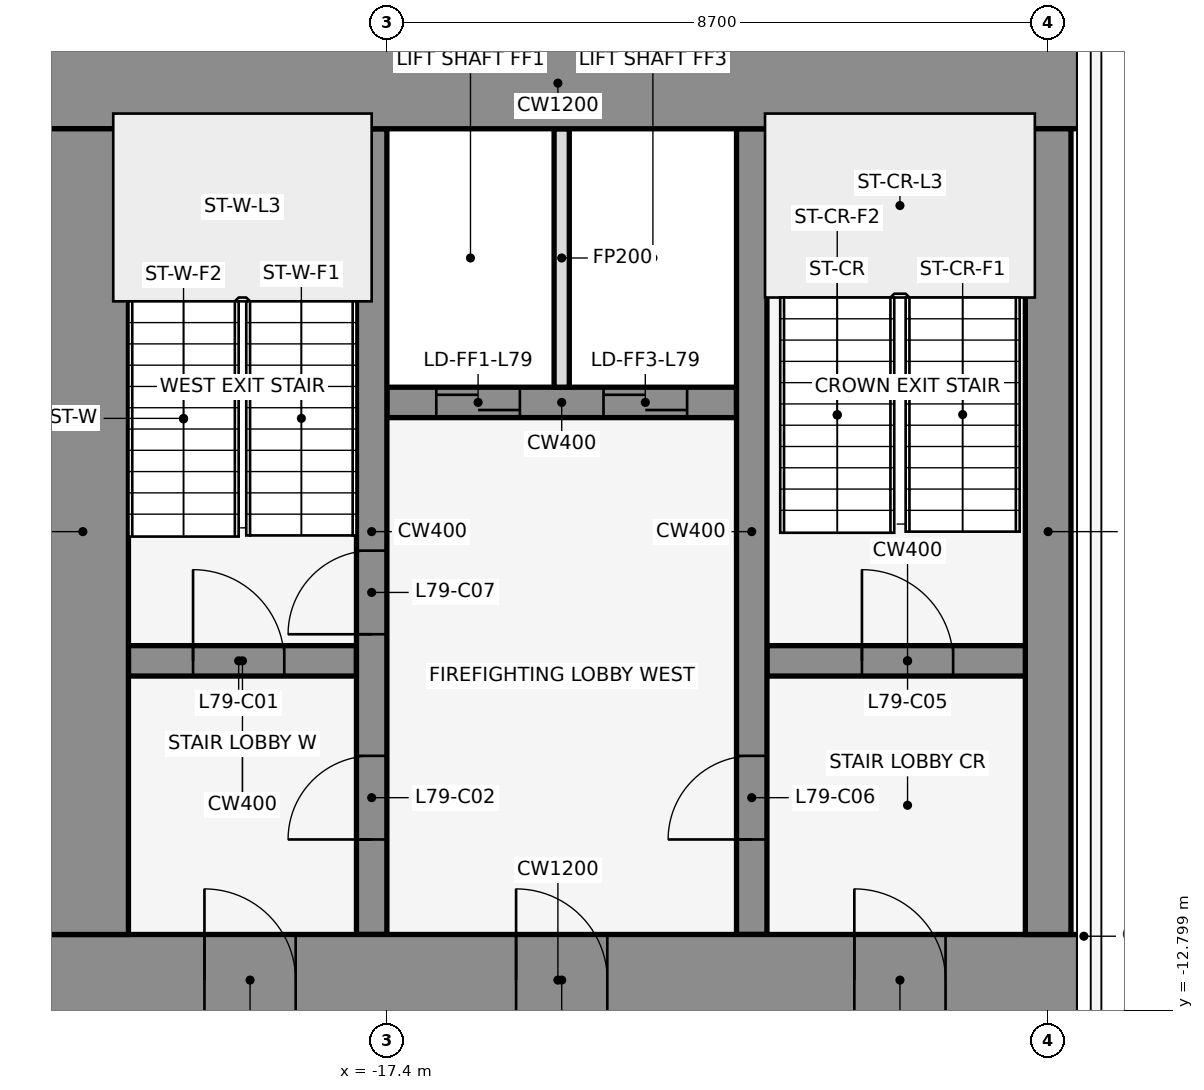
"""IFC4 building model, lengths in metres.
Left out: names, types, materials, properties, quantities, classifications, styles, units other than length and angle.
Written with IfcOpenShell. Run it as: python <this file> out.ifc"""

import sys

from ifc_helpers import new_model, si_unit, direction, frame, frame_2d, origin, place, context, subcontext, project, spatial, rectangle, extrude, element, fill, save


model = new_model("IFC4")
c1 = context("Model", 3, precision=1e-05, world=origin(), true_north=direction((0.0, 1.0)))
c2 = subcontext(c1, "Body", "Model", "MODEL_VIEW")
j1 = project(units=[si_unit("LENGTHUNIT", "METRE"), si_unit("PLANEANGLEUNIT", "RADIAN")], contexts=[c1])
p1 = place(None, origin())
s1 = spatial("IfcSite", under=j1, at=p1, CompositionType="ELEMENT")
p2 = place(p1, origin())
s2 = spatial("IfcBuilding", under=s1, at=p2, CompositionType="ELEMENT")
p3 = place(p2, frame((0.0, 0.0, 352.4)))
s3 = spatial("IfcBuildingStorey", under=s2, at=p3, CompositionType="ELEMENT", Elevation=352.4)
p4 = place(p3, frame((-20.8, -8.2, 0.0), z_axis=(0.0, 0.0, 1.0), x_axis=(1.0, 0.0, 0.0)))
e1 = element("IfcWall", 1, at=p4, inside=s3, PredefinedType="SHEAR", context=c2, shape_type="SweptSolid", body=[
    extrude(rectangle(XDim=3.0, YDim=0.4, at=frame_2d((1.5, 0.0))), origin(), (0.0, 0.0, 1.0), 4.5),
])
p5 = place(p4, frame((0.85, 0.0, 0.0)))
e2 = element("IfcOpeningElement", 2, at=p5, cuts=e1, PredefinedType="OPENING", context=c2, shape_type="SweptSolid", body=[
    extrude(rectangle(XDim=1.2, YDim=2.1, at=frame_2d((0.6, 1.05))), frame((0.0, 0.212, 0.0), z_axis=(0.0, -1.0, 0.0), x_axis=(1.0, 0.0, 0.0)), (0.0, 0.0, 1.0), 0.424),
])
p6 = place(p3, frame((-12.4, -8.2, 0.0), z_axis=(0.0, 0.0, 1.0), x_axis=(1.0, 0.0, 0.0)))
e3 = element("IfcWall", 3, at=p6, inside=s3, PredefinedType="SHEAR", context=c2, shape_type="SweptSolid", body=[
    extrude(rectangle(XDim=3.7, YDim=0.4, at=frame_2d((1.85, 0.0))), origin(), (0.0, 0.0, 1.0), 4.5),
])
p7 = place(p6, frame((1.25, 0.0, 0.0)))
e4 = element("IfcOpeningElement", 4, at=p7, cuts=e3, PredefinedType="OPENING", context=c2, shape_type="SweptSolid", body=[
    extrude(rectangle(XDim=1.2, YDim=2.1, at=frame_2d((0.6, 1.05))), frame((0.0, 0.212, 0.0), z_axis=(0.0, -1.0, 0.0), x_axis=(1.0, 0.0, 0.0)), (0.0, 0.0, 1.0), 0.424),
])
p8 = place(p3, frame((-17.4, -4.8, 0.0), z_axis=(0.0, 0.0, 1.0), x_axis=(1.0, 0.0, 0.0)))
e5 = element("IfcWall", 5, at=p8, inside=s3, PredefinedType="SHEAR", context=c2, shape_type="SweptSolid", body=[
    extrude(rectangle(XDim=4.6, YDim=0.4, at=frame_2d((2.3, 0.0))), origin(), (0.0, 0.0, 1.0), 4.5),
])
p9 = place(p8, frame((0.65, 0.0, 0.0)))
e6 = element("IfcOpeningElement", 6, at=p9, cuts=e5, PredefinedType="OPENING", context=c2, shape_type="SweptSolid", body=[
    extrude(rectangle(XDim=1.1, YDim=2.1, at=frame_2d((0.55, 1.05))), frame((0.0, 0.212, 0.0), z_axis=(0.0, -1.0, 0.0), x_axis=(1.0, 0.0, 0.0)), (0.0, 0.0, 1.0), 0.424),
])
p10 = place(p8, frame((2.85, 0.0, 0.0)))
e7 = element("IfcOpeningElement", 7, at=p10, cuts=e5, PredefinedType="OPENING", context=c2, shape_type="SweptSolid", body=[
    extrude(rectangle(XDim=1.1, YDim=2.1, at=frame_2d((0.55, 1.05))), frame((0.0, 0.212, 0.0), z_axis=(0.0, -1.0, 0.0), x_axis=(1.0, 0.0, 0.0)), (0.0, 0.0, 1.0), 0.424),
])
p11 = place(p3, frame((-17.6, -11.8, 0.0), z_axis=(0.0, 0.0, 1.0), x_axis=(0.0, 1.0, 0.0)))
e8 = element("IfcWall", 8, at=p11, inside=s3, PredefinedType="SHEAR", context=c2, shape_type="SweptSolid", body=[
    extrude(rectangle(XDim=10.6, YDim=0.4, at=frame_2d((5.3, 0.0))), origin(), (0.0, 0.0, 1.0), 4.5),
])
p12 = place(p11, frame((1.25, 0.0, 0.0)))
e9 = element("IfcOpeningElement", 9, at=p12, cuts=e8, PredefinedType="OPENING", context=c2, shape_type="SweptSolid", body=[
    extrude(rectangle(XDim=1.1, YDim=2.1, at=frame_2d((0.55, 1.05))), frame((0.0, 0.212, 0.0), z_axis=(0.0, -1.0, 0.0), x_axis=(1.0, 0.0, 0.0)), (0.0, 0.0, 1.0), 0.424),
])
p13 = place(p11, frame((3.95, 0.0, 0.0)))
e10 = element("IfcOpeningElement", 10, at=p13, cuts=e8, PredefinedType="OPENING", context=c2, shape_type="SweptSolid", body=[
    extrude(rectangle(XDim=1.1, YDim=2.1, at=frame_2d((0.55, 1.05))), frame((0.0, 0.212, 0.0), z_axis=(0.0, -1.0, 0.0), x_axis=(1.0, 0.0, 0.0)), (0.0, 0.0, 1.0), 0.424),
])
p14 = place(p3, frame((-15.1, -4.6, 0.0), z_axis=(0.0, 0.0, 1.0), x_axis=(0.0, 1.0, 0.0)))
e11 = element("IfcWall", 11, at=p14, inside=s3, PredefinedType="PARTITIONING", context=c2, shape_type="SweptSolid", body=[
    extrude(rectangle(XDim=3.4, YDim=0.2, at=frame_2d((1.7, 0.0))), origin(), (0.0, 0.0, 1.0), 3.368),
])
p15 = place(p3, frame((-12.6, -11.8, 0.0), z_axis=(0.0, 0.0, 1.0), x_axis=(0.0, 1.0, 0.0)))
e12 = element("IfcWall", 12, at=p15, inside=s3, PredefinedType="SHEAR", context=c2, shape_type="SweptSolid", body=[
    extrude(rectangle(XDim=10.6, YDim=0.4, at=frame_2d((5.3, 0.0))), origin(), (0.0, 0.0, 1.0), 4.5),
])
p16 = place(p15, frame((1.25, 0.0, 0.0)))
e13 = element("IfcOpeningElement", 13, at=p16, cuts=e12, PredefinedType="OPENING", context=c2, shape_type="SweptSolid", body=[
    extrude(rectangle(XDim=1.1, YDim=2.1, at=frame_2d((0.55, 1.05))), frame((0.0, 0.212, 0.0), z_axis=(0.0, -1.0, 0.0), x_axis=(1.0, 0.0, 0.0)), (0.0, 0.0, 1.0), 0.424),
])
p17 = place(p3, frame((-22.0, -0.6, 0.0), z_axis=(0.0, 0.0, 1.0), x_axis=(1.0, 0.0, 0.0)))
e14 = element("IfcWall", 14, at=p17, inside=s3, PredefinedType="SHEAR", context=c2, shape_type="SweptSolid", body=[
    extrude(rectangle(XDim=13.7, YDim=1.2, at=frame_2d((6.85, 0.0))), origin(), (0.0, 0.0, 1.0), 4.5),
])
p18 = place(p3, frame((-22.0, -12.4, 0.0), z_axis=(0.0, 0.0, 1.0), x_axis=(1.0, 0.0, 0.0)))
e15 = element("IfcWall", 15, at=p18, inside=s3, PredefinedType="SHEAR", context=c2, shape_type="SweptSolid", body=[
    extrude(rectangle(XDim=13.7, YDim=1.2, at=frame_2d((6.85, 0.0))), origin(), (0.0, 0.0, 1.0), 4.5),
])
p19 = place(p18, frame((2.2, 0.0, 0.0)))
e16 = element("IfcOpeningElement", 16, at=p19, cuts=e15, PredefinedType="OPENING", context=c2, shape_type="SweptSolid", body=[
    extrude(rectangle(XDim=1.2, YDim=2.1, at=frame_2d((0.6, 1.05))), frame((0.0, 0.612, 0.0), z_axis=(0.0, -1.0, 0.0), x_axis=(1.0, 0.0, 0.0)), (0.0, 0.0, 1.0), 1.224),
])
p20 = place(p18, frame((10.75, 0.0, 0.0)))
e17 = element("IfcOpeningElement", 17, at=p20, cuts=e15, PredefinedType="OPENING", context=c2, shape_type="SweptSolid", body=[
    extrude(rectangle(XDim=1.2, YDim=2.1, at=frame_2d((0.6, 1.05))), frame((0.0, 0.612, 0.0), z_axis=(0.0, -1.0, 0.0), x_axis=(1.0, 0.0, 0.0)), (0.0, 0.0, 1.0), 1.224),
])
p21 = place(p18, frame((6.3, 0.0, 0.0)))
e18 = element("IfcOpeningElement", 18, at=p21, cuts=e15, PredefinedType="OPENING", context=c2, shape_type="SweptSolid", body=[
    extrude(rectangle(XDim=1.2, YDim=2.1, at=frame_2d((0.6, 1.05))), frame((0.0, 0.612, 0.0), z_axis=(0.0, -1.0, 0.0), x_axis=(1.0, 0.0, 0.0)), (0.0, 0.0, 1.0), 1.224),
])
p22 = place(p3, frame((-21.4, -11.8, 0.0), z_axis=(0.0, 0.0, 1.0), x_axis=(0.0, 1.0, 0.0)))
e19 = element("IfcWall", 19, at=p22, inside=s3, PredefinedType="SHEAR", context=c2, shape_type="SweptSolid", body=[
    extrude(rectangle(XDim=10.6, YDim=1.2, at=frame_2d((5.3, 0.0))), origin(), (0.0, 0.0, 1.0), 4.5),
])
p23 = place(p3, frame((-8.7, -11.8, 0.0), z_axis=(0.0, 0.0, 1.0), x_axis=(0.0, 1.0, 0.0)))
e20 = element("IfcWall", 20, at=p23, inside=s3, PredefinedType="SHEAR", context=c2, shape_type="SweptSolid", body=[
    extrude(rectangle(XDim=10.6, YDim=0.6, at=frame_2d((5.3, 0.0))), origin(), (0.0, 0.0, 1.0), 4.5),
])
p24 = place(p5, origin())
e21 = element("IfcDoor", 21, at=p24, inside=s3, OperationType="SINGLE_SWING_LEFT", PredefinedType="DOOR", context=c2, shape_type="SweptSolid", body=[
    extrude(rectangle(XDim=1.2, YDim=2.1, at=frame_2d((0.6, 1.05))), frame((0.0, 0.025, 0.0), z_axis=(0.0, -1.0, 0.0), x_axis=(1.0, 0.0, 0.0)), (0.0, 0.0, 1.0), 0.05),
])
fill(e2, e21)
p25 = place(p12, frame((1.1, 0.0, 0.0), z_axis=(0.0, 0.0, 1.0), x_axis=(-1.0, 0.0, 0.0)))
e22 = element("IfcDoor", 22, at=p25, inside=s3, OperationType="SINGLE_SWING_LEFT", PredefinedType="DOOR", context=c2, shape_type="SweptSolid", body=[
    extrude(rectangle(XDim=1.1, YDim=2.1, at=frame_2d((0.55, 1.05))), frame((0.0, 0.025, 0.0), z_axis=(0.0, -1.0, 0.0), x_axis=(1.0, 0.0, 0.0)), (0.0, 0.0, 1.0), 0.05),
])
fill(e9, e22)
p26 = place(p7, origin())
e23 = element("IfcDoor", 23, at=p26, inside=s3, OperationType="SINGLE_SWING_LEFT", PredefinedType="DOOR", context=c2, shape_type="SweptSolid", body=[
    extrude(rectangle(XDim=1.2, YDim=2.1, at=frame_2d((0.6, 1.05))), frame((0.0, 0.025, 0.0), z_axis=(0.0, -1.0, 0.0), x_axis=(1.0, 0.0, 0.0)), (0.0, 0.0, 1.0), 0.05),
])
fill(e4, e23)
p27 = place(p16, origin())
e24 = element("IfcDoor", 24, at=p27, inside=s3, OperationType="SINGLE_SWING_RIGHT", PredefinedType="DOOR", context=c2, shape_type="SweptSolid", body=[
    extrude(rectangle(XDim=1.1, YDim=2.1, at=frame_2d((0.55, 1.05))), frame((0.0, 0.025, 0.0), z_axis=(0.0, -1.0, 0.0), x_axis=(1.0, 0.0, 0.0)), (0.0, 0.0, 1.0), 0.05),
])
fill(e13, e24)
p28 = place(p9, origin())
e25 = element("IfcDoor", 25, at=p28, inside=s3, OperationType="DOUBLE_DOOR_SLIDING", PredefinedType="DOOR", context=c2, shape_type="SweptSolid", body=[
    extrude(rectangle(XDim=1.1, YDim=2.1, at=frame_2d((0.55, 1.05))), frame((0.0, 0.025, 0.0), z_axis=(0.0, -1.0, 0.0), x_axis=(1.0, 0.0, 0.0)), (0.0, 0.0, 1.0), 0.05),
])
fill(e6, e25)
p29 = place(p10, origin())
e26 = element("IfcDoor", 26, at=p29, inside=s3, OperationType="DOUBLE_DOOR_SLIDING", PredefinedType="DOOR", context=c2, shape_type="SweptSolid", body=[
    extrude(rectangle(XDim=1.1, YDim=2.1, at=frame_2d((0.55, 1.05))), frame((0.0, 0.025, 0.0), z_axis=(0.0, -1.0, 0.0), x_axis=(1.0, 0.0, 0.0)), (0.0, 0.0, 1.0), 0.05),
])
fill(e7, e26)
p30 = place(p13, frame((1.1, 0.0, 0.0), z_axis=(0.0, 0.0, 1.0), x_axis=(-1.0, 0.0, 0.0)))
e27 = element("IfcDoor", 27, at=p30, inside=s3, OperationType="SINGLE_SWING_RIGHT", PredefinedType="DOOR", context=c2, shape_type="SweptSolid", body=[
    extrude(rectangle(XDim=1.1, YDim=2.1, at=frame_2d((0.55, 1.05))), frame((0.0, 0.025, 0.0), z_axis=(0.0, -1.0, 0.0), x_axis=(1.0, 0.0, 0.0)), (0.0, 0.0, 1.0), 0.05),
])
fill(e10, e27)
p31 = place(p19, frame((1.2, 0.0, 0.0), z_axis=(0.0, 0.0, 1.0), x_axis=(-1.0, 0.0, 0.0)))
e28 = element("IfcDoor", 28, at=p31, inside=s3, OperationType="SINGLE_SWING_RIGHT", PredefinedType="DOOR", context=c2, shape_type="SweptSolid", body=[
    extrude(rectangle(XDim=1.2, YDim=2.1, at=frame_2d((0.6, 1.05))), frame((0.0, 0.025, 0.0), z_axis=(0.0, -1.0, 0.0), x_axis=(1.0, 0.0, 0.0)), (0.0, 0.0, 1.0), 0.05),
])
fill(e16, e28)
p32 = place(p20, frame((1.2, 0.0, 0.0), z_axis=(0.0, 0.0, 1.0), x_axis=(-1.0, 0.0, 0.0)))
e29 = element("IfcDoor", 29, at=p32, inside=s3, OperationType="SINGLE_SWING_RIGHT", PredefinedType="DOOR", context=c2, shape_type="SweptSolid", body=[
    extrude(rectangle(XDim=1.2, YDim=2.1, at=frame_2d((0.6, 1.05))), frame((0.0, 0.025, 0.0), z_axis=(0.0, -1.0, 0.0), x_axis=(1.0, 0.0, 0.0)), (0.0, 0.0, 1.0), 0.05),
])
fill(e17, e29)
p33 = place(p21, frame((1.2, 0.0, 0.0), z_axis=(0.0, 0.0, 1.0), x_axis=(-1.0, 0.0, 0.0)))
e30 = element("IfcDoor", 30, at=p33, inside=s3, OperationType="SINGLE_SWING_RIGHT", PredefinedType="DOOR", context=c2, shape_type="SweptSolid", body=[
    extrude(rectangle(XDim=1.2, YDim=2.1, at=frame_2d((0.6, 1.05))), frame((0.0, 0.025, 0.0), z_axis=(0.0, -1.0, 0.0), x_axis=(1.0, 0.0, 0.0)), (0.0, 0.0, 1.0), 0.05),
])
fill(e18, e30)
save(model, sys.argv[1])
